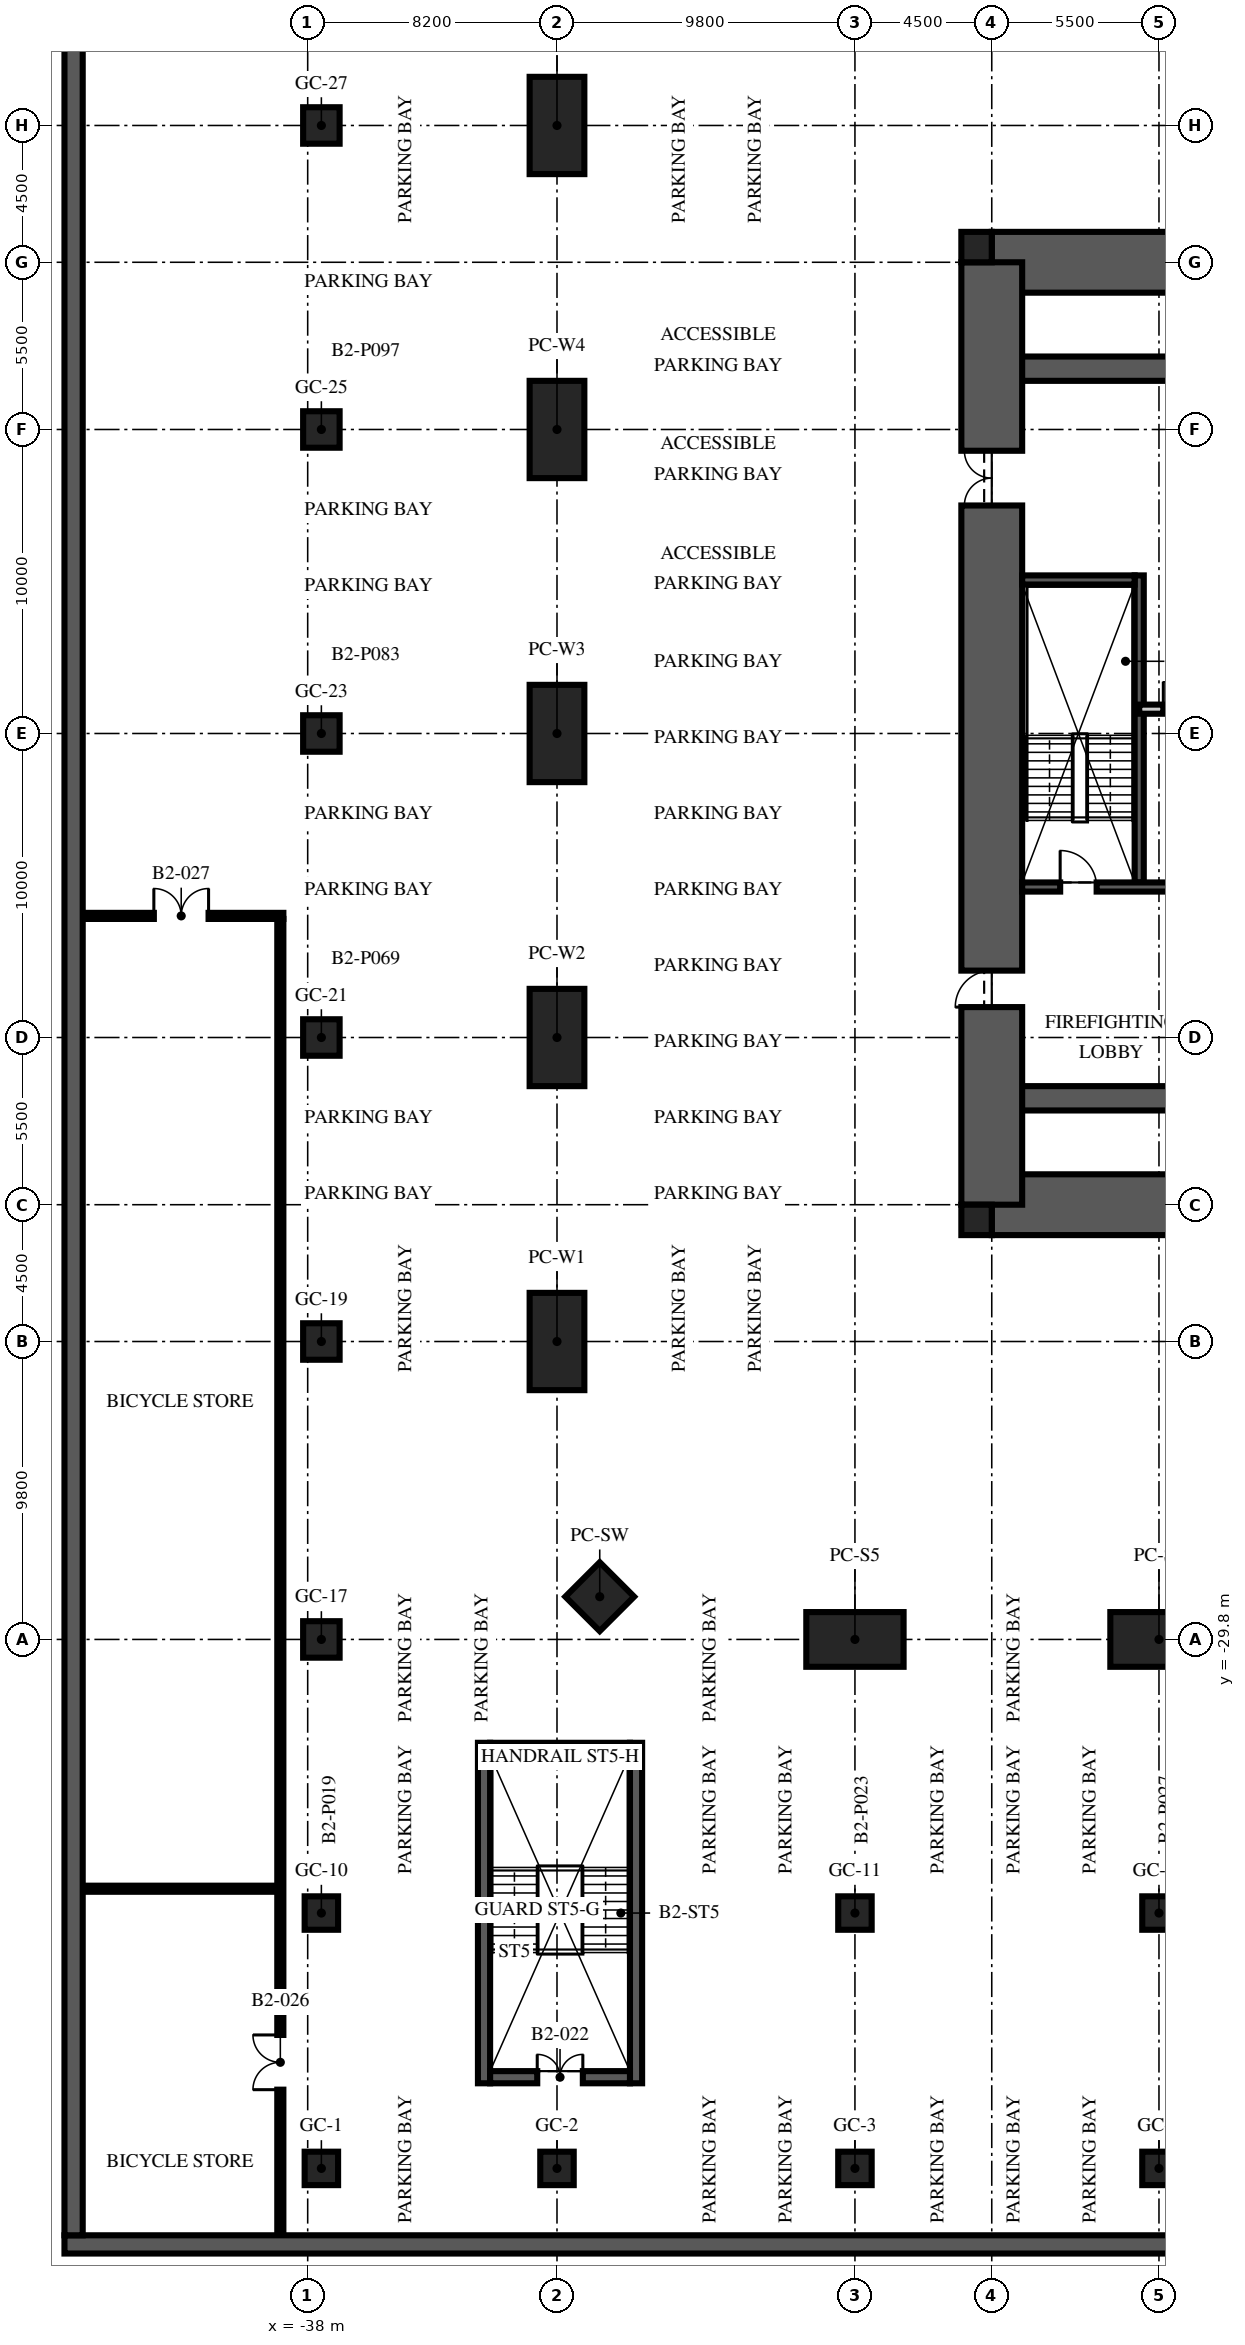
"""IFC4 building model, lengths in metres.
Left out: names, types, materials, properties, quantities, classifications, styles, units other than length and angle.
Written with IfcOpenShell. Run it as: python <this file> out.ifc"""

import sys

from ifc_helpers import new_model, si_unit, direction, frame, frame_2d, origin, origin_2d, place, context, subcontext, project, spatial, rectangle, hollow_rectangle, extrude, element, fill, save


model = new_model("IFC4")
c1 = context("Model", 3, precision=1e-05, world=origin(), true_north=direction((0.0, 1.0)))
c2 = subcontext(c1, "Body", "Model", "MODEL_VIEW")
j1 = project(units=[si_unit("LENGTHUNIT", "METRE"), si_unit("PLANEANGLEUNIT", "RADIAN")], contexts=[c1])
p1 = place(None, origin())
s1 = spatial("IfcSite", under=j1, at=p1, CompositionType="ELEMENT")
p2 = place(p1, origin())
s2 = spatial("IfcBuilding", under=s1, at=p2, CompositionType="ELEMENT")
p3 = place(p2, frame((0.0, 0.0, -9.0)))
s3 = spatial("IfcBuildingStorey", under=s2, at=p3, CompositionType="ELEMENT", Elevation=-9.0)
p4 = place(p3, frame((-15.5, 15.5, -0.3), z_axis=(0.0, 0.0, 1.0), x_axis=(1.0, 0.0, 0.0)))
e1 = element("IfcWall", 1, at=p4, inside=s3, PredefinedType="SHEAR", context=c2, shape_type="SweptSolid", body=[
    extrude(rectangle(XDim=31.0, YDim=2.0, at=frame_2d((15.5, 0.0))), origin(), (0.0, 0.0, 1.0), 3.6),
])
p5 = place(p4, frame((10.4, 0.0, 0.3)))
e2 = element("IfcOpeningElement", 2, at=p5, cuts=e1, PredefinedType="OPENING", context=c2, shape_type="SweptSolid", body=[
    extrude(rectangle(XDim=1.1, YDim=2.1, at=frame_2d((0.55, 1.05))), frame((0.0, 1.01, 0.0), z_axis=(0.0, -1.0, 0.0), x_axis=(1.0, 0.0, 0.0)), (0.0, 0.0, 1.0), 2.02),
])
p6 = place(p4, frame((13.5, 0.0, 0.3)))
e3 = element("IfcOpeningElement", 3, at=p6, cuts=e1, PredefinedType="OPENING", context=c2, shape_type="SweptSolid", body=[
    extrude(rectangle(XDim=1.1, YDim=2.1, at=frame_2d((0.55, 1.05))), frame((0.0, 1.01, 0.0), z_axis=(0.0, -1.0, 0.0), x_axis=(1.0, 0.0, 0.0)), (0.0, 0.0, 1.0), 2.02),
])
p7 = place(p4, frame((16.6, 0.0, 0.3)))
e4 = element("IfcOpeningElement", 4, at=p7, cuts=e1, PredefinedType="OPENING", context=c2, shape_type="SweptSolid", body=[
    extrude(rectangle(XDim=1.1, YDim=2.1, at=frame_2d((0.55, 1.05))), frame((0.0, 1.01, 0.0), z_axis=(0.0, -1.0, 0.0), x_axis=(1.0, 0.0, 0.0)), (0.0, 0.0, 1.0), 2.02),
])
p8 = place(p3, frame((-15.5, -15.5, -0.3), z_axis=(0.0, 0.0, 1.0), x_axis=(1.0, 0.0, 0.0)))
e5 = element("IfcWall", 5, at=p8, inside=s3, PredefinedType="SHEAR", context=c2, shape_type="SweptSolid", body=[
    extrude(rectangle(XDim=31.0, YDim=2.0, at=frame_2d((15.5, 0.0))), origin(), (0.0, 0.0, 1.0), 3.6),
])
for number, where, z_axis, x_axis in (
    (6, (-15.5, 12.0, -0.3), (0.0, 0.0, 1.0), (1.0, 0.0, 0.0)),
    (7, (-15.5, -12.0, -0.3), (0.0, 0.0, 1.0), (1.0, 0.0, 0.0)),
):
    element("IfcWall", number, at=place(p3, frame(where, z_axis=z_axis, x_axis=x_axis)), inside=s3, PredefinedType="SHEAR", context=c2, shape_type="SweptSolid", body=[
        extrude(rectangle(XDim=31.0, YDim=0.8, at=frame_2d((15.5, 0.0))), origin(), (0.0, 0.0, 1.0), 3.6),
    ])
p9 = place(p3, frame((-15.5, -15.5, -0.3), z_axis=(0.0, 0.0, 1.0), x_axis=(0.0, 1.0, 0.0)))
e8 = element("IfcWall", 8, at=p9, inside=s3, PredefinedType="SHEAR", context=c2, shape_type="SweptSolid", body=[
    extrude(rectangle(XDim=31.0, YDim=2.0, at=frame_2d((15.5, 0.0))), origin(), (0.0, 0.0, 1.0), 3.6),
])
p10 = place(p9, frame((6.5, 0.0, 0.3)))
e9 = element("IfcOpeningElement", 9, at=p10, cuts=e8, PredefinedType="OPENING", context=c2, shape_type="SweptSolid", body=[
    extrude(rectangle(XDim=1.2, YDim=2.1, at=frame_2d((0.6, 1.05))), frame((0.0, 1.01, 0.0), z_axis=(0.0, -1.0, 0.0), x_axis=(1.0, 0.0, 0.0)), (0.0, 0.0, 1.0), 2.02),
])
p11 = place(p9, frame((23.0, 0.0, 0.3)))
e10 = element("IfcOpeningElement", 10, at=p11, cuts=e8, PredefinedType="OPENING", context=c2, shape_type="SweptSolid", body=[
    extrude(rectangle(XDim=1.8, YDim=2.1, at=frame_2d((0.9, 1.05))), frame((0.0, 1.01, 0.0), z_axis=(0.0, -1.0, 0.0), x_axis=(1.0, 0.0, 0.0)), (0.0, 0.0, 1.0), 2.02),
])
for number, where, z_axis, x_axis in (
    (11, (-16.0, 16.0, -0.3), (0.0, 0.0, 1.0), (1.0, 0.0, 0.0)),
    (12, (-16.0, -16.0, -0.3), (0.0, 0.0, 1.0), (1.0, 0.0, 0.0)),
):
    element("IfcColumn", number, at=place(p3, frame(where, z_axis=z_axis, x_axis=x_axis)), inside=s3, PredefinedType="COLUMN", context=c2, shape_type="SweptSolid", body=[
        extrude(rectangle(XDim=1.0, YDim=1.0, at=origin_2d()), origin(), (0.0, 0.0, 1.0), 3.6),
    ])
p12 = place(p3, frame((-46.0, -49.7, -0.3), z_axis=(0.0, 0.0, 1.0), x_axis=(1.0, 0.0, 0.0)))
e13 = element("IfcWall", 13, at=p12, inside=s3, PredefinedType="SOLIDWALL", context=c2, shape_type="SweptSolid", body=[
    extrude(rectangle(XDim=92.0, YDim=0.6, at=frame_2d((46.0, 0.0))), origin(), (0.0, 0.0, 1.0), 3.6),
])
p13 = place(p3, frame((-45.7, -49.4, -0.3), z_axis=(0.0, 0.0, 1.0), x_axis=(0.0, 1.0, 0.0)))
e14 = element("IfcWall", 14, at=p13, inside=s3, PredefinedType="SOLIDWALL", context=c2, shape_type="SweptSolid", body=[
    extrude(rectangle(XDim=98.8, YDim=0.6, at=frame_2d((49.4, 0.0))), origin(), (0.0, 0.0, 1.0), 3.6),
])
for number, where, z_axis, x_axis in (
    (15, (-10.0, -29.8, 0.0), (0.0, 0.0, 1.0), (1.0, 0.0, 0.0)),
    (16, (-20.0, -29.8, 0.0), (0.0, 0.0, 1.0), (1.0, 0.0, 0.0)),
    (17, (-29.8, -20.0, 0.0), (0.0, 0.0, 1.0), (0.0, 1.0, 0.0)),
    (18, (-29.8, -10.0, 0.0), (0.0, 0.0, 1.0), (0.0, 1.0, 0.0)),
    (19, (-29.8, 0.0, 0.0), (0.0, 0.0, 1.0), (0.0, 1.0, 0.0)),
    (20, (-29.8, 10.0, 0.0), (0.0, 0.0, 1.0), (0.0, 1.0, 0.0)),
    (21, (-29.8, 20.0, 0.0), (0.0, 0.0, 1.0), (0.0, 1.0, 0.0)),
):
    element("IfcColumn", number, at=place(p3, frame(where, z_axis=z_axis, x_axis=x_axis)), inside=s3, PredefinedType="COLUMN", context=c2, shape_type="SweptSolid", body=[
        extrude(hollow_rectangle(XDim=3.2, YDim=1.8, WallThickness=0.2, at=origin_2d()), origin(), (0.0, 0.0, 1.0), 3.6),
    ])
p14 = place(p3, frame((-28.394, -28.394, 0.0), z_axis=(0.0, 0.0, 1.0), x_axis=(0.707106781187, -0.707106781187, 0.0)))
e22 = element("IfcColumn", 22, at=p14, inside=s3, PredefinedType="COLUMN", context=c2, shape_type="SweptSolid", body=[
    extrude(hollow_rectangle(XDim=1.6, YDim=1.6, WallThickness=0.1, at=origin_2d()), origin(), (0.0, 0.0, 1.0), 3.6),
])
for number, where, z_axis, x_axis in (
    (23, (-37.55, -47.2, 0.0), (0.0, 0.0, 1.0), (1.0, 0.0, 0.0)),
    (24, (-29.8, -47.2, 0.0), (0.0, 0.0, 1.0), (1.0, 0.0, 0.0)),
    (25, (-20.0, -47.2, 0.0), (0.0, 0.0, 1.0), (1.0, 0.0, 0.0)),
    (26, (-10.0, -47.2, 0.0), (0.0, 0.0, 1.0), (1.0, 0.0, 0.0)),
    (27, (-37.55, -38.8, 0.0), (0.0, 0.0, 1.0), (1.0, 0.0, 0.0)),
    (28, (-20.0, -38.8, 0.0), (0.0, 0.0, 1.0), (1.0, 0.0, 0.0)),
    (29, (-10.0, -38.8, 0.0), (0.0, 0.0, 1.0), (1.0, 0.0, 0.0)),
):
    element("IfcColumn", number, at=place(p3, frame(where, z_axis=z_axis, x_axis=x_axis)), inside=s3, PredefinedType="COLUMN", context=c2, shape_type="SweptSolid", body=[
        extrude(rectangle(XDim=1.1, YDim=1.1, at=origin_2d()), origin(), (0.0, 0.0, 1.0), 3.6),
    ])
for number, where, z_axis, x_axis in (
    (30, (-37.55, -29.8, 0.0), (0.0, 0.0, 1.0), (1.0, 0.0, 0.0)),
    (31, (-37.55, -20.0, 0.0), (0.0, 0.0, 1.0), (1.0, 0.0, 0.0)),
    (32, (-37.55, -10.0, 0.0), (0.0, 0.0, 1.0), (1.0, 0.0, 0.0)),
    (33, (-37.55, 0.0, 0.0), (0.0, 0.0, 1.0), (1.0, 0.0, 0.0)),
    (34, (-37.55, 10.0, 0.0), (0.0, 0.0, 1.0), (1.0, 0.0, 0.0)),
    (35, (-37.55, 20.0, 0.0), (0.0, 0.0, 1.0), (1.0, 0.0, 0.0)),
):
    element("IfcColumn", number, at=place(p3, frame(where, z_axis=z_axis, x_axis=x_axis)), inside=s3, PredefinedType="COLUMN", context=c2, shape_type="SweptSolid", body=[
        extrude(rectangle(XDim=1.2, YDim=1.2, at=origin_2d()), origin(), (0.0, 0.0, 1.0), 3.6),
    ])
p15 = place(p3, frame((-10.65, -4.9, 0.0), z_axis=(0.0, 0.0, 1.0), x_axis=(0.0, 1.0, 0.0)))
e36 = element("IfcWall", 36, at=p15, inside=s3, PredefinedType="SOLIDWALL", context=c2, shape_type="SweptSolid", body=[
    extrude(rectangle(XDim=10.1, YDim=0.3, at=frame_2d((5.05, 0.0))), origin(), (0.0, 0.0, 1.0), 3.3),
])
p16 = place(p3, frame((-14.5, -5.05, 0.0), z_axis=(0.0, 0.0, 1.0), x_axis=(1.0, 0.0, 0.0)))
e37 = element("IfcWall", 37, at=p16, inside=s3, PredefinedType="SOLIDWALL", context=c2, shape_type="SweptSolid", body=[
    extrude(rectangle(XDim=5.7, YDim=0.3, at=frame_2d((2.85, 0.0))), origin(), (0.0, 0.0, 1.0), 3.3),
])
p17 = place(p16, frame((1.25, 0.0, 0.0)))
e38 = element("IfcOpeningElement", 38, at=p17, cuts=e37, PredefinedType="OPENING", context=c2, shape_type="SweptSolid", body=[
    extrude(rectangle(XDim=1.2, YDim=2.1, at=frame_2d((0.6, 1.05))), frame((0.0, 0.16, 0.0), z_axis=(0.0, -1.0, 0.0), x_axis=(1.0, 0.0, 0.0)), (0.0, 0.0, 1.0), 0.32),
])
p18 = place(p3, frame((-14.5, 5.05, 0.0), z_axis=(0.0, 0.0, 1.0), x_axis=(1.0, 0.0, 0.0)))
e39 = element("IfcWall", 39, at=p18, inside=s3, PredefinedType="SOLIDWALL", context=c2, shape_type="SweptSolid", body=[
    extrude(rectangle(XDim=3.7, YDim=0.3, at=frame_2d((1.85, 0.0))), origin(), (0.0, 0.0, 1.0), 3.3),
])
p19 = place(p3, frame((-10.65, 0.8, 0.0), z_axis=(0.0, 0.0, 1.0), x_axis=(1.0, 0.0, 0.0)))
e40 = element("IfcWall", 40, at=p19, inside=s3, PredefinedType="PARTITIONING", context=c2, shape_type="SweptSolid", body=[
    extrude(rectangle(XDim=21.3, YDim=0.3, at=frame_2d((10.65, 0.0))), origin(), (0.0, 0.0, 1.0), 3.3),
])
p20 = place(p19, frame((10.05, 0.0, 0.0)))
e41 = element("IfcOpeningElement", 41, at=p20, cuts=e40, PredefinedType="OPENING", context=c2, shape_type="SweptSolid", body=[
    extrude(rectangle(XDim=1.2, YDim=2.1, at=frame_2d((0.6, 1.05))), frame((0.0, 0.16, 0.0), z_axis=(0.0, -1.0, 0.0), x_axis=(1.0, 0.0, 0.0)), (0.0, 0.0, 1.0), 0.32),
])
p21 = place(p19, frame((0.793, 0.0, 0.0)))
e42 = element("IfcOpeningElement", 42, at=p21, cuts=e40, PredefinedType="OPENING", context=c2, shape_type="SweptSolid", body=[
    extrude(rectangle(XDim=0.9, YDim=2.1, at=frame_2d((0.45, 1.05))), frame((0.0, 0.16, 0.0), z_axis=(0.0, -1.0, 0.0), x_axis=(1.0, 0.0, 0.0)), (0.0, 0.0, 1.0), 0.32),
])
for number, where, z_axis, x_axis in (
    (43, (-32.2, -44.4, -0.3), (0.0, 0.0, 1.0), (0.0, 1.0, 0.0)),
    (44, (-27.2, -44.4, -0.3), (0.0, 0.0, 1.0), (0.0, 1.0, 0.0)),
):
    element("IfcWall", number, at=place(p3, frame(where, z_axis=z_axis, x_axis=x_axis)), inside=s3, PredefinedType="SOLIDWALL", context=c2, shape_type="SweptSolid", body=[
        extrude(rectangle(XDim=11.2, YDim=0.4, at=frame_2d((5.6, 0.0))), origin(), (0.0, 0.0, 1.0), 3.6),
    ])
p22 = place(p3, frame((-32.0, -44.2, -0.3), z_axis=(0.0, 0.0, 1.0), x_axis=(1.0, 0.0, 0.0)))
e45 = element("IfcWall", 45, at=p22, inside=s3, PredefinedType="SOLIDWALL", context=c2, shape_type="SweptSolid", body=[
    extrude(rectangle(XDim=4.6, YDim=0.4, at=frame_2d((2.3, 0.0))), origin(), (0.0, 0.0, 1.0), 3.6),
])
p23 = place(p22, frame((1.55, 0.0, 0.3)))
e46 = element("IfcOpeningElement", 46, at=p23, cuts=e45, PredefinedType="OPENING", context=c2, shape_type="SweptSolid", body=[
    extrude(rectangle(XDim=1.5, YDim=2.1, at=frame_2d((0.75, 1.05))), frame((0.0, 0.21, 0.0), z_axis=(0.0, -1.0, 0.0), x_axis=(1.0, 0.0, 0.0)), (0.0, 0.0, 1.0), 0.42),
])
p24 = place(p3, frame((-32.0, -33.4, -0.3), z_axis=(0.0, 0.0, 1.0), x_axis=(1.0, 0.0, 0.0)))
e47 = element("IfcWall", 47, at=p24, inside=s3, PredefinedType="SOLIDWALL", context=c2, shape_type="SweptSolid", body=[
    extrude(rectangle(XDim=4.6, YDim=0.4, at=frame_2d((2.3, 0.0))), origin(), (0.0, 0.0, 1.0), 3.6),
])
p25 = place(p3, frame((-38.9, -49.38, 0.0), z_axis=(0.0, 0.0, 1.0), x_axis=(0.0, 1.0, 0.0)))
e48 = element("IfcWall", 48, at=p25, inside=s3, PredefinedType="SOLIDWALL", context=c2, shape_type="SweptSolid", body=[
    extrude(rectangle(XDim=43.28, YDim=0.2, at=frame_2d((21.64, 0.0))), origin(), (0.0, 0.0, 1.0), 2.3),
])
p26 = place(p25, frame((4.77, 0.0, 0.0)))
e49 = element("IfcOpeningElement", 49, at=p26, cuts=e48, PredefinedType="OPENING", context=c2, shape_type="SweptSolid", body=[
    extrude(rectangle(XDim=1.8, YDim=2.4, at=frame_2d((0.9, 1.2))), frame((0.0, 0.11, 0.0), z_axis=(0.0, -1.0, 0.0), x_axis=(1.0, 0.0, 0.0)), (0.0, 0.0, 1.0), 0.22),
])
p27 = place(p3, frame((-45.38, -38.0, 0.0), z_axis=(0.0, 0.0, 1.0), x_axis=(1.0, 0.0, 0.0)))
e50 = element("IfcWall", 50, at=p27, inside=s3, PredefinedType="SOLIDWALL", context=c2, shape_type="SweptSolid", body=[
    extrude(rectangle(XDim=6.38, YDim=0.2, at=frame_2d((3.19, 0.0))), origin(), (0.0, 0.0, 1.0), 3.3),
])
p28 = place(p3, frame((-45.38, -6.0, 0.0), z_axis=(0.0, 0.0, 1.0), x_axis=(1.0, 0.0, 0.0)))
e51 = element("IfcWall", 51, at=p28, inside=s3, PredefinedType="SOLIDWALL", context=c2, shape_type="SweptSolid", body=[
    extrude(rectangle(XDim=6.58, YDim=0.2, at=frame_2d((3.29, 0.0))), origin(), (0.0, 0.0, 1.0), 3.3),
])
p29 = place(p28, frame((2.32, 0.0, 0.0)))
e52 = element("IfcOpeningElement", 52, at=p29, cuts=e51, PredefinedType="OPENING", context=c2, shape_type="SweptSolid", body=[
    extrude(rectangle(XDim=1.8, YDim=2.4, at=frame_2d((0.9, 1.2))), frame((0.0, 0.11, 0.0), z_axis=(0.0, -1.0, 0.0), x_axis=(1.0, 0.0, 0.0)), (0.0, 0.0, 1.0), 0.22),
])
p30 = place(p17, origin())
e53 = element("IfcDoor", 53, at=p30, inside=s3, OperationType="SINGLE_SWING_LEFT", PredefinedType="DOOR", context=c2, shape_type="SweptSolid", body=[
    extrude(rectangle(XDim=1.2, YDim=2.1, at=frame_2d((0.6, 1.05))), frame((0.0, 0.025, 0.0), z_axis=(0.0, -1.0, 0.0), x_axis=(1.0, 0.0, 0.0)), (0.0, 0.0, 1.0), 0.05),
])
fill(e38, e53)
p31 = place(p10, origin())
e54 = element("IfcDoor", 54, at=p31, inside=s3, OperationType="SINGLE_SWING_LEFT", PredefinedType="DOOR", context=c2, shape_type="SweptSolid", body=[
    extrude(rectangle(XDim=1.2, YDim=2.1, at=frame_2d((0.6, 1.05))), frame((0.0, 0.025, 0.0), z_axis=(0.0, -1.0, 0.0), x_axis=(1.0, 0.0, 0.0)), (0.0, 0.0, 1.0), 0.05),
])
fill(e9, e54)
p32 = place(p11, origin())
e55 = element("IfcDoor", 55, at=p32, inside=s3, OperationType="DOUBLE_DOOR_SINGLE_SWING", PredefinedType="DOOR", context=c2, shape_type="SweptSolid", body=[
    extrude(rectangle(XDim=1.8, YDim=2.1, at=frame_2d((0.9, 1.05))), frame((0.0, 0.025, 0.0), z_axis=(0.0, -1.0, 0.0), x_axis=(1.0, 0.0, 0.0)), (0.0, 0.0, 1.0), 0.05),
])
fill(e10, e55)
p33 = place(p21, origin())
e56 = element("IfcDoor", 56, at=p33, inside=s3, OperationType="SINGLE_SWING_LEFT", PredefinedType="DOOR", context=c2, shape_type="SweptSolid", body=[
    extrude(rectangle(XDim=0.9, YDim=2.1, at=frame_2d((0.45, 1.05))), frame((0.0, 0.025, 0.0), z_axis=(0.0, -1.0, 0.0), x_axis=(1.0, 0.0, 0.0)), (0.0, 0.0, 1.0), 0.05),
])
fill(e42, e56)
p34 = place(p23, origin())
e57 = element("IfcDoor", 57, at=p34, inside=s3, OperationType="DOUBLE_DOOR_SINGLE_SWING", PredefinedType="DOOR", context=c2, shape_type="SweptSolid", body=[
    extrude(rectangle(XDim=1.5, YDim=2.1, at=frame_2d((0.75, 1.05))), frame((0.0, 0.025, 0.0), z_axis=(0.0, -1.0, 0.0), x_axis=(1.0, 0.0, 0.0)), (0.0, 0.0, 1.0), 0.05),
])
fill(e46, e57)
p35 = place(p26, origin())
e58 = element("IfcDoor", 58, at=p35, inside=s3, OperationType="DOUBLE_DOOR_SINGLE_SWING", PredefinedType="DOOR", context=c2, shape_type="SweptSolid", body=[
    extrude(rectangle(XDim=1.8, YDim=2.4, at=frame_2d((0.9, 1.2))), frame((0.0, 0.025, 0.0), z_axis=(0.0, -1.0, 0.0), x_axis=(1.0, 0.0, 0.0)), (0.0, 0.0, 1.0), 0.05),
])
fill(e49, e58)
p36 = place(p29, origin())
e59 = element("IfcDoor", 59, at=p36, inside=s3, OperationType="DOUBLE_DOOR_SINGLE_SWING", PredefinedType="DOOR", context=c2, shape_type="SweptSolid", body=[
    extrude(rectangle(XDim=1.8, YDim=2.4, at=frame_2d((0.9, 1.2))), frame((0.0, 0.025, 0.0), z_axis=(0.0, -1.0, 0.0), x_axis=(1.0, 0.0, 0.0)), (0.0, 0.0, 1.0), 0.05),
])
fill(e52, e59)
save(model, sys.argv[1])
